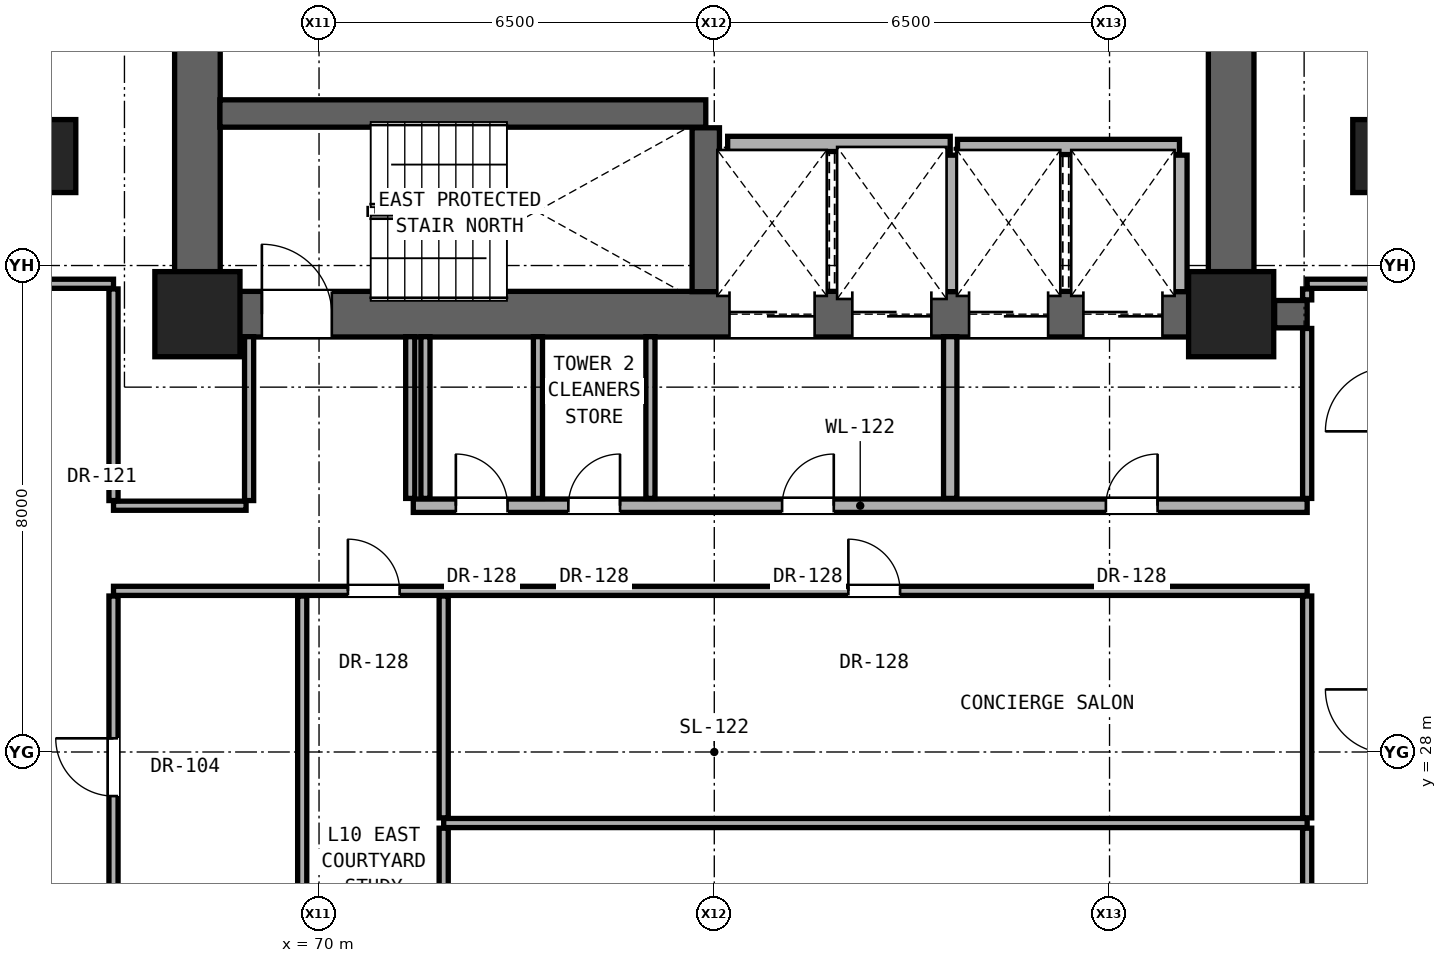
"""IFC4 building model, lengths in metres.
Left out: names, types, materials, properties, quantities, classifications, styles, units other than length and angle.
Written with IfcOpenShell. Run it as: python <this file> out.ifc"""

import sys

from ifc_helpers import new_model, si_unit, direction, frame, frame_2d, origin, origin_2d, place, context, subcontext, project, spatial, rectangle, extrude, element, fill, save


model = new_model("IFC4")
c1 = context("Model", 3, precision=1e-05, world=origin(), true_north=direction((0.0, 1.0)))
c2 = subcontext(c1, "Body", "Model", "MODEL_VIEW")
j1 = project(units=[si_unit("LENGTHUNIT", "METRE"), si_unit("PLANEANGLEUNIT", "RADIAN")], contexts=[c1])
p1 = place(None, origin())
s1 = spatial("IfcSite", under=j1, at=p1, CompositionType="ELEMENT")
p2 = place(p1, origin())
s2 = spatial("IfcBuilding", under=s1, at=p2, CompositionType="ELEMENT")
p3 = place(p2, frame((0.0, 0.0, 38.9)))
s3 = spatial("IfcBuildingStorey", under=s2, at=p3, CompositionType="ELEMENT", Elevation=38.9)
for number, where, z_axis, x_axis in (
    (1, (68.0, 35.2, 0.0), (0.0, 0.0, 1.0), (1.0, 0.0, 0.0)),
    (2, (85.0, 35.2, 0.0), (0.0, 0.0, 1.0), (1.0, 0.0, 0.0)),
):
    element("IfcColumn", number, at=place(p3, frame(where, z_axis=z_axis, x_axis=x_axis)), inside=s3, PredefinedType="COLUMN", context=c2, shape_type="SweptSolid", body=[
        extrude(rectangle(XDim=1.4, YDim=1.4, at=origin_2d()), origin(), (0.0, 0.0, 1.0), 3.3),
    ])
for number, where, z_axis, x_axis in (
    (3, (65.6, 37.8, 0.0), (0.0, 0.0, 1.0), (1.0, 0.0, 0.0)),
    (4, (87.4, 37.8, 0.0), (0.0, 0.0, 1.0), (1.0, 0.0, 0.0)),
):
    element("IfcColumn", number, at=place(p3, frame(where, z_axis=z_axis, x_axis=x_axis)), inside=s3, PredefinedType="PILASTER", context=c2, shape_type="SweptSolid", body=[
        extrude(rectangle(XDim=0.8, YDim=1.2, at=origin_2d()), origin(), (0.0, 0.0, 1.0), 3.3),
    ])
for number, where, z_axis, x_axis in (
    (5, (68.0, 35.2, 0.0), (0.0, 0.0, 1.0), (0.0, 1.0, 0.0)),
    (6, (85.0, 35.2, 0.0), (0.0, 0.0, 1.0), (0.0, 1.0, 0.0)),
):
    element("IfcWall", number, at=place(p3, frame(where, z_axis=z_axis, x_axis=x_axis)), inside=s3, PredefinedType="SHEAR", context=c2, shape_type="SweptSolid", body=[
        extrude(rectangle(XDim=5.6, YDim=0.75, at=frame_2d((2.8, 0.0))), origin(), (0.0, 0.0, 1.0), 3.06),
    ])
p4 = place(p3, frame((68.0, 35.2, 0.0), z_axis=(0.0, 0.0, 1.0), x_axis=(1.0, 0.0, 0.0)))
e7 = element("IfcWall", 7, at=p4, inside=s3, PredefinedType="SHEAR", context=c2, shape_type="SweptSolid", body=[
    extrude(rectangle(XDim=17.0, YDim=0.75, at=frame_2d((8.5, 0.0))), origin(), (0.0, 0.0, 1.0), 3.06),
])
p5 = place(p4, frame((1.06, 0.0, 0.0)))
e8 = element("IfcOpeningElement", 8, at=p5, cuts=e7, PredefinedType="OPENING", context=c2, shape_type="SweptSolid", body=[
    extrude(rectangle(XDim=1.15, YDim=2.2, at=frame_2d((0.575, 1.1))), frame((0.0, 0.385, 0.0), z_axis=(0.0, -1.0, 0.0), x_axis=(1.0, 0.0, 0.0)), (0.0, 0.0, 1.0), 0.77),
])
p6 = place(p4, frame((8.75, 0.0, 0.0)))
e9 = element("IfcOpeningElement", 9, at=p6, cuts=e7, PredefinedType="OPENING", context=c2, shape_type="SweptSolid", body=[
    extrude(rectangle(XDim=1.4, YDim=2.35, at=frame_2d((0.7, 1.175))), frame((0.0, 0.385, 0.0), z_axis=(0.0, -1.0, 0.0), x_axis=(1.0, 0.0, 0.0)), (0.0, 0.0, 1.0), 0.77),
])
p7 = place(p4, frame((10.77, 0.0, 0.0)))
e10 = element("IfcOpeningElement", 10, at=p7, cuts=e7, PredefinedType="OPENING", context=c2, shape_type="SweptSolid", body=[
    extrude(rectangle(XDim=1.3, YDim=2.3, at=frame_2d((0.65, 1.15))), frame((0.0, 0.385, 0.0), z_axis=(0.0, -1.0, 0.0), x_axis=(1.0, 0.0, 0.0)), (0.0, 0.0, 1.0), 0.77),
])
p8 = place(p4, frame((12.69, 0.0, 0.0)))
e11 = element("IfcOpeningElement", 11, at=p8, cuts=e7, PredefinedType="OPENING", context=c2, shape_type="SweptSolid", body=[
    extrude(rectangle(XDim=1.3, YDim=2.3, at=frame_2d((0.65, 1.15))), frame((0.0, 0.385, 0.0), z_axis=(0.0, -1.0, 0.0), x_axis=(1.0, 0.0, 0.0)), (0.0, 0.0, 1.0), 0.77),
])
p9 = place(p4, frame((14.57, 0.0, 0.0)))
e12 = element("IfcOpeningElement", 12, at=p9, cuts=e7, PredefinedType="OPENING", context=c2, shape_type="SweptSolid", body=[
    extrude(rectangle(XDim=1.3, YDim=2.3, at=frame_2d((0.65, 1.15))), frame((0.0, 0.385, 0.0), z_axis=(0.0, -1.0, 0.0), x_axis=(1.0, 0.0, 0.0)), (0.0, 0.0, 1.0), 0.77),
])
p10 = place(p3, frame((72.05, 26.832, 0.0), z_axis=(0.0, 0.0, 1.0), x_axis=(1.0, 0.0, 0.0)))
e13 = element("IfcWall", 13, at=p10, inside=s3, PredefinedType="PARTITIONING", context=c2, shape_type="SweptSolid", body=[
    extrude(rectangle(XDim=14.2, YDim=0.15, at=frame_2d((7.1, 0.0))), origin(), (0.0, 0.0, 1.0), 2.125),
])
p11 = place(p3, frame((66.62, 30.65, 0.0), z_axis=(0.0, 0.0, 1.0), x_axis=(1.0, 0.0, 0.0)))
e14 = element("IfcWall", 14, at=p11, inside=s3, PredefinedType="PARTITIONING", context=c2, shape_type="SweptSolid", body=[
    extrude(rectangle(XDim=19.63, YDim=0.15, at=frame_2d((9.815, 0.0))), origin(), (0.0, 0.0, 1.0), 2.125),
])
p12 = place(p11, frame((3.855, 0.0, 0.0)))
e15 = element("IfcOpeningElement", 15, at=p12, cuts=e14, PredefinedType="OPENING", context=c2, shape_type="SweptSolid", body=[
    extrude(rectangle(XDim=0.85, YDim=2.01, at=frame_2d((0.425, 1.005))), frame((0.0, 0.085, 0.0), z_axis=(0.0, -1.0, 0.0), x_axis=(1.0, 0.0, 0.0)), (0.0, 0.0, 1.0), 0.17),
])
p13 = place(p11, frame((12.085, 0.0, 0.0)))
e16 = element("IfcOpeningElement", 16, at=p13, cuts=e14, PredefinedType="OPENING", context=c2, shape_type="SweptSolid", body=[
    extrude(rectangle(XDim=0.85, YDim=2.01, at=frame_2d((0.425, 1.005))), frame((0.0, 0.085, 0.0), z_axis=(0.0, -1.0, 0.0), x_axis=(1.0, 0.0, 0.0)), (0.0, 0.0, 1.0), 0.17),
])
p14 = place(p3, frame((66.62, 32.05, 0.0), z_axis=(0.0, 0.0, 1.0), x_axis=(1.0, 0.0, 0.0)))
e17 = element("IfcWall", 17, at=p14, inside=s3, PredefinedType="PARTITIONING", context=c2, shape_type="SweptSolid", body=[
    extrude(rectangle(XDim=2.18, YDim=0.15, at=frame_2d((1.09, 0.0))), origin(), (0.0, 0.0, 1.0), 2.125),
])
p15 = place(p3, frame((71.55, 32.05, 0.0), z_axis=(0.0, 0.0, 1.0), x_axis=(1.0, 0.0, 0.0)))
e18 = element("IfcWall", 18, at=p15, inside=s3, PredefinedType="SOLIDWALL", context=c2, shape_type="SweptSolid", body=[
    extrude(rectangle(XDim=14.7, YDim=0.22, at=frame_2d((7.35, 0.0))), origin(), (0.0, 0.0, 1.0), 2.125),
])
p16 = place(p15, frame((11.39, 0.0, 0.0)))
e19 = element("IfcOpeningElement", 19, at=p16, cuts=e18, PredefinedType="OPENING", context=c2, shape_type="SweptSolid", body=[
    extrude(rectangle(XDim=0.85, YDim=2.01, at=frame_2d((0.425, 1.005))), frame((0.0, 0.12, 0.0), z_axis=(0.0, -1.0, 0.0), x_axis=(1.0, 0.0, 0.0)), (0.0, 0.0, 1.0), 0.24),
])
p17 = place(p15, frame((6.065, 0.0, 0.0)))
e20 = element("IfcOpeningElement", 20, at=p17, cuts=e18, PredefinedType="OPENING", context=c2, shape_type="SweptSolid", body=[
    extrude(rectangle(XDim=0.85, YDim=2.01, at=frame_2d((0.425, 1.005))), frame((0.0, 0.12, 0.0), z_axis=(0.0, -1.0, 0.0), x_axis=(1.0, 0.0, 0.0)), (0.0, 0.0, 1.0), 0.24),
])
p18 = place(p15, frame((0.7, 0.0, 0.0)))
e21 = element("IfcOpeningElement", 21, at=p18, cuts=e18, PredefinedType="OPENING", context=c2, shape_type="SweptSolid", body=[
    extrude(rectangle(XDim=0.85, YDim=2.01, at=frame_2d((0.425, 1.005))), frame((0.0, 0.12, 0.0), z_axis=(0.0, -1.0, 0.0), x_axis=(1.0, 0.0, 0.0)), (0.0, 0.0, 1.0), 0.24),
])
p19 = place(p15, frame((2.55, 0.0, 0.0)))
e22 = element("IfcOpeningElement", 22, at=p19, cuts=e18, PredefinedType="OPENING", context=c2, shape_type="SweptSolid", body=[
    extrude(rectangle(XDim=0.85, YDim=2.01, at=frame_2d((0.425, 1.005))), frame((0.0, 0.12, 0.0), z_axis=(0.0, -1.0, 0.0), x_axis=(1.0, 0.0, 0.0)), (0.0, 0.0, 1.0), 0.24),
])
p20 = place(p3, frame((85.715, 35.2, 0.0), z_axis=(0.0, 0.0, 1.0), x_axis=(1.0, 0.0, 0.0)))
e23 = element("IfcWall", 23, at=p20, inside=s3, PredefinedType="SHEAR", context=c2, shape_type="SweptSolid", body=[
    extrude(rectangle(XDim=0.535, YDim=0.45, at=frame_2d((0.268, 0.0))), origin(), (0.0, 0.0, 1.0), 3.06),
])
p21 = place(p3, frame((65.25, 35.7, 0.0), z_axis=(0.0, 0.0, 1.0), x_axis=(1.0, 0.0, 0.0)))
e24 = element("IfcWall", 24, at=p21, inside=s3, PredefinedType="PARTITIONING", context=c2, shape_type="SweptSolid", body=[
    extrude(rectangle(XDim=1.37, YDim=0.15, at=frame_2d((0.685, 0.0))), origin(), (0.0, 0.0, 1.0), 3.06),
])
p22 = place(p3, frame((86.25, 35.7, 0.0), z_axis=(0.0, 0.0, 1.0), x_axis=(1.0, 0.0, 0.0)))
e25 = element("IfcWall", 25, at=p22, inside=s3, PredefinedType="PARTITIONING", context=c2, shape_type="SweptSolid", body=[
    extrude(rectangle(XDim=1.35, YDim=0.15, at=frame_2d((0.675, 0.0))), origin(), (0.0, 0.0, 1.0), 3.06),
])
p23 = place(p3, frame((80.5, 37.95, 0.0), z_axis=(0.0, 0.0, 1.0), x_axis=(1.0, 0.0, 0.0)))
e26 = element("IfcWall", 26, at=p23, inside=s3, PredefinedType="SOLIDWALL", context=c2, shape_type="SweptSolid", body=[
    extrude(rectangle(XDim=3.65, YDim=0.25, at=frame_2d((1.825, 0.0))), origin(), (0.0, 0.0, 1.0), 3.06),
])
p24 = place(p3, frame((76.72, 38.0, 0.0), z_axis=(0.0, 0.0, 1.0), x_axis=(1.0, 0.0, 0.0)))
e27 = element("IfcWall", 27, at=p24, inside=s3, PredefinedType="SOLIDWALL", context=c2, shape_type="SweptSolid", body=[
    extrude(rectangle(XDim=3.66, YDim=0.25, at=frame_2d((1.83, 0.0))), origin(), (0.0, 0.0, 1.0), 3.06),
])
p25 = place(p3, frame((68.37, 38.5, 0.0), z_axis=(0.0, 0.0, 1.0), x_axis=(1.0, 0.0, 0.0)))
e28 = element("IfcWall", 28, at=p25, inside=s3, PredefinedType="SHEAR", context=c2, shape_type="SweptSolid", body=[
    extrude(rectangle(XDim=7.99, YDim=0.45, at=frame_2d((3.995, 0.0))), origin(), (0.0, 0.0, 1.0), 3.06),
])
p26 = place(p3, frame((66.62, 24.935, 0.0), z_axis=(0.0, 0.0, 1.0), x_axis=(0.0, 1.0, 0.0)))
e29 = element("IfcWall", 29, at=p26, inside=s3, PredefinedType="PARTITIONING", context=c2, shape_type="SweptSolid", body=[
    extrude(rectangle(XDim=5.63, YDim=0.15, at=frame_2d((2.815, 0.0))), origin(), (0.0, 0.0, 1.0), 2.279),
])
p27 = place(p26, frame((2.34, 0.0, 0.0)))
e30 = element("IfcOpeningElement", 30, at=p27, cuts=e29, PredefinedType="OPENING", context=c2, shape_type="SweptSolid", body=[
    extrude(rectangle(XDim=0.95, YDim=2.15, at=frame_2d((0.475, 1.075))), frame((0.0, 0.085, 0.0), z_axis=(0.0, -1.0, 0.0), x_axis=(1.0, 0.0, 0.0)), (0.0, 0.0, 1.0), 0.17),
])
p28 = place(p3, frame((66.62, 32.135, 0.0), z_axis=(0.0, 0.0, 1.0), x_axis=(0.0, 1.0, 0.0)))
e31 = element("IfcWall", 31, at=p28, inside=s3, PredefinedType="PARTITIONING", context=c2, shape_type="SweptSolid", body=[
    extrude(rectangle(XDim=3.48, YDim=0.15, at=frame_2d((1.74, 0.0))), origin(), (0.0, 0.0, 1.0), 2.452),
])
p29 = place(p3, frame((68.85, 32.135, 0.0), z_axis=(0.0, 0.0, 1.0), x_axis=(0.0, 1.0, 0.0)))
e32 = element("IfcWall", 32, at=p29, inside=s3, PredefinedType="PARTITIONING", context=c2, shape_type="SweptSolid", body=[
    extrude(rectangle(XDim=2.695, YDim=0.15, at=frame_2d((1.348, 0.0))), origin(), (0.0, 0.0, 1.0), 3.06),
])
p30 = place(p3, frame((69.723, 24.935, 0.0), z_axis=(0.0, 0.0, 1.0), x_axis=(0.0, 1.0, 0.0)))
e33 = element("IfcWall", 33, at=p30, inside=s3, PredefinedType="PARTITIONING", context=c2, shape_type="SweptSolid", body=[
    extrude(rectangle(XDim=5.63, YDim=0.15, at=frame_2d((2.815, 0.0))), origin(), (0.0, 0.0, 1.0), 2.125),
])
for number, where, z_axis, x_axis in (
    (34, (71.5, 32.17, 0.0), (0.0, 0.0, 1.0), (0.0, 1.0, 0.0)),
    (35, (71.75, 32.17, 0.0), (0.0, 0.0, 1.0), (0.0, 1.0, 0.0)),
):
    element("IfcWall", number, at=place(p3, frame(where, z_axis=z_axis, x_axis=x_axis)), inside=s3, PredefinedType="PARTITIONING", context=c2, shape_type="SweptSolid", body=[
        extrude(rectangle(XDim=2.66, YDim=0.15, at=frame_2d((1.33, 0.0))), origin(), (0.0, 0.0, 1.0), 3.06),
    ])
p31 = place(p3, frame((72.05, 22.435, 0.0), z_axis=(0.0, 0.0, 1.0), x_axis=(0.0, 1.0, 0.0)))
e36 = element("IfcWall", 36, at=p31, inside=s3, PredefinedType="PARTITIONING", context=c2, shape_type="SweptSolid", body=[
    extrude(rectangle(XDim=4.312, YDim=0.15, at=frame_2d((2.156, 0.0))), origin(), (0.0, 0.0, 1.0), 2.589),
])
p32 = place(p3, frame((72.05, 26.917, 0.0), z_axis=(0.0, 0.0, 1.0), x_axis=(0.0, 1.0, 0.0)))
e37 = element("IfcWall", 37, at=p32, inside=s3, PredefinedType="PARTITIONING", context=c2, shape_type="SweptSolid", body=[
    extrude(rectangle(XDim=3.648, YDim=0.15, at=frame_2d((1.824, 0.0))), origin(), (0.0, 0.0, 1.0), 2.125),
])
for number, where, z_axis, x_axis in (
    (38, (73.6, 32.17, 0.0), (0.0, 0.0, 1.0), (0.0, 1.0, 0.0)),
    (39, (75.45, 32.17, 0.0), (0.0, 0.0, 1.0), (0.0, 1.0, 0.0)),
):
    element("IfcWall", number, at=place(p3, frame(where, z_axis=z_axis, x_axis=x_axis)), inside=s3, PredefinedType="PARTITIONING", context=c2, shape_type="SweptSolid", body=[
        extrude(rectangle(XDim=2.66, YDim=0.15, at=frame_2d((1.33, 0.0))), origin(), (0.0, 0.0, 1.0), 3.06),
    ])
p33 = place(p3, frame((76.36, 35.57, 0.0), z_axis=(0.0, 0.0, 1.0), x_axis=(0.0, 1.0, 0.0)))
e40 = element("IfcWall", 40, at=p33, inside=s3, PredefinedType="SHEAR", context=c2, shape_type="SweptSolid", body=[
    extrude(rectangle(XDim=2.695, YDim=0.45, at=frame_2d((1.347, 0.0))), origin(), (0.0, 0.0, 1.0), 3.06),
])
p34 = place(p3, frame((80.38, 32.17, 0.0), z_axis=(0.0, 0.0, 1.0), x_axis=(0.0, 1.0, 0.0)))
e41 = element("IfcWall", 41, at=p34, inside=s3, PredefinedType="SOLIDWALL", context=c2, shape_type="SweptSolid", body=[
    extrude(rectangle(XDim=2.66, YDim=0.22, at=frame_2d((1.33, 0.0))), origin(), (0.0, 0.0, 1.0), 3.06),
])
for number, where, z_axis, x_axis in (
    (42, (80.38, 35.57, 0.0), (0.0, 0.0, 1.0), (0.0, 1.0, 0.0)),
    (43, (84.15, 35.57, 0.0), (0.0, 0.0, 1.0), (0.0, 1.0, 0.0)),
):
    element("IfcWall", number, at=place(p3, frame(where, z_axis=z_axis, x_axis=x_axis)), inside=s3, PredefinedType="SOLIDWALL", context=c2, shape_type="SweptSolid", body=[
        extrude(rectangle(XDim=2.245, YDim=0.25, at=frame_2d((1.123, 0.0))), origin(), (0.0, 0.0, 1.0), 3.06),
    ])
p35 = place(p3, frame((86.25, 22.435, 0.0), z_axis=(0.0, 0.0, 1.0), x_axis=(0.0, 1.0, 0.0)))
e44 = element("IfcWall", 44, at=p35, inside=s3, PredefinedType="PARTITIONING", context=c2, shape_type="SweptSolid", body=[
    extrude(rectangle(XDim=4.312, YDim=0.15, at=frame_2d((2.156, 0.0))), origin(), (0.0, 0.0, 1.0), 3.06),
])
p36 = place(p3, frame((86.25, 26.917, 0.0), z_axis=(0.0, 0.0, 1.0), x_axis=(0.0, 1.0, 0.0)))
e45 = element("IfcWall", 45, at=p36, inside=s3, PredefinedType="PARTITIONING", context=c2, shape_type="SweptSolid", body=[
    extrude(rectangle(XDim=3.648, YDim=0.15, at=frame_2d((1.824, 0.0))), origin(), (0.0, 0.0, 1.0), 2.279),
])
p37 = place(p3, frame((86.25, 32.17, 0.0), z_axis=(0.0, 0.0, 1.0), x_axis=(0.0, 1.0, 0.0)))
e46 = element("IfcWall", 46, at=p37, inside=s3, PredefinedType="PARTITIONING", context=c2, shape_type="SweptSolid", body=[
    extrude(rectangle(XDim=2.795, YDim=0.15, at=frame_2d((1.397, 0.0))), origin(), (0.0, 0.0, 1.0), 2.452),
])
p38 = place(p3, frame((86.25, 35.435, 0.0), z_axis=(0.0, 0.0, 1.0), x_axis=(0.0, 1.0, 0.0)))
e47 = element("IfcWall", 47, at=p38, inside=s3, PredefinedType="PARTITIONING", context=c2, shape_type="SweptSolid", body=[
    extrude(rectangle(XDim=0.18, YDim=0.15, at=frame_2d((0.09, 0.0))), origin(), (0.0, 0.0, 1.0), 2.452),
])
p39 = place(p16, origin())
e48 = element("IfcDoor", 48, at=p39, inside=s3, OperationType="SINGLE_SWING_RIGHT", PredefinedType="DOOR", context=c2, shape_type="SweptSolid", body=[
    extrude(rectangle(XDim=0.85, YDim=2.01, at=frame_2d((0.425, 1.005))), frame((0.0, 0.025, 0.0), z_axis=(0.0, -1.0, 0.0), x_axis=(1.0, 0.0, 0.0)), (0.0, 0.0, 1.0), 0.05),
])
fill(e19, e48)
p40 = place(p5, origin())
e49 = element("IfcDoor", 49, at=p40, inside=s3, OperationType="SINGLE_SWING_LEFT", PredefinedType="DOOR", context=c2, shape_type="SweptSolid", body=[
    extrude(rectangle(XDim=1.15, YDim=2.2, at=frame_2d((0.575, 1.1))), frame((0.0, 0.025, 0.0), z_axis=(0.0, -1.0, 0.0), x_axis=(1.0, 0.0, 0.0)), (0.0, 0.0, 1.0), 0.05),
])
fill(e8, e49)
p41 = place(p17, origin())
e50 = element("IfcDoor", 50, at=p41, inside=s3, OperationType="SINGLE_SWING_RIGHT", PredefinedType="DOOR", context=c2, shape_type="SweptSolid", body=[
    extrude(rectangle(XDim=0.85, YDim=2.01, at=frame_2d((0.425, 1.005))), frame((0.0, 0.025, 0.0), z_axis=(0.0, -1.0, 0.0), x_axis=(1.0, 0.0, 0.0)), (0.0, 0.0, 1.0), 0.05),
])
fill(e20, e50)
p42 = place(p18, origin())
e51 = element("IfcDoor", 51, at=p42, inside=s3, OperationType="SINGLE_SWING_LEFT", PredefinedType="DOOR", context=c2, shape_type="SweptSolid", body=[
    extrude(rectangle(XDim=0.85, YDim=2.01, at=frame_2d((0.425, 1.005))), frame((0.0, 0.025, 0.0), z_axis=(0.0, -1.0, 0.0), x_axis=(1.0, 0.0, 0.0)), (0.0, 0.0, 1.0), 0.05),
])
fill(e21, e51)
p43 = place(p19, origin())
e52 = element("IfcDoor", 52, at=p43, inside=s3, OperationType="SINGLE_SWING_RIGHT", PredefinedType="DOOR", context=c2, shape_type="SweptSolid", body=[
    extrude(rectangle(XDim=0.85, YDim=2.01, at=frame_2d((0.425, 1.005))), frame((0.0, 0.025, 0.0), z_axis=(0.0, -1.0, 0.0), x_axis=(1.0, 0.0, 0.0)), (0.0, 0.0, 1.0), 0.05),
])
fill(e22, e52)
p44 = place(p27, origin())
e53 = element("IfcDoor", 53, at=p44, inside=s3, OperationType="SINGLE_SWING_RIGHT", PredefinedType="DOOR", context=c2, shape_type="SweptSolid", body=[
    extrude(rectangle(XDim=0.95, YDim=2.15, at=frame_2d((0.475, 1.075))), frame((0.0, 0.025, 0.0), z_axis=(0.0, -1.0, 0.0), x_axis=(1.0, 0.0, 0.0)), (0.0, 0.0, 1.0), 0.05),
])
fill(e30, e53)
p45 = place(p12, origin())
e54 = element("IfcDoor", 54, at=p45, inside=s3, OperationType="SINGLE_SWING_LEFT", PredefinedType="DOOR", context=c2, shape_type="SweptSolid", body=[
    extrude(rectangle(XDim=0.85, YDim=2.01, at=frame_2d((0.425, 1.005))), frame((0.0, 0.025, 0.0), z_axis=(0.0, -1.0, 0.0), x_axis=(1.0, 0.0, 0.0)), (0.0, 0.0, 1.0), 0.05),
])
fill(e15, e54)
p46 = place(p13, origin())
e55 = element("IfcDoor", 55, at=p46, inside=s3, OperationType="SINGLE_SWING_LEFT", PredefinedType="DOOR", context=c2, shape_type="SweptSolid", body=[
    extrude(rectangle(XDim=0.85, YDim=2.01, at=frame_2d((0.425, 1.005))), frame((0.0, 0.025, 0.0), z_axis=(0.0, -1.0, 0.0), x_axis=(1.0, 0.0, 0.0)), (0.0, 0.0, 1.0), 0.05),
])
fill(e16, e55)
p47 = place(p6, origin())
e56 = element("IfcDoor", 56, at=p47, inside=s3, OperationType="DOUBLE_DOOR_SLIDING", PredefinedType="DOOR", context=c2, shape_type="SweptSolid", body=[
    extrude(rectangle(XDim=1.4, YDim=2.35, at=frame_2d((0.7, 1.175))), frame((0.0, 0.025, 0.0), z_axis=(0.0, -1.0, 0.0), x_axis=(1.0, 0.0, 0.0)), (0.0, 0.0, 1.0), 0.05),
])
fill(e9, e56)
p48 = place(p7, origin())
e57 = element("IfcDoor", 57, at=p48, inside=s3, OperationType="DOUBLE_DOOR_SLIDING", PredefinedType="DOOR", context=c2, shape_type="SweptSolid", body=[
    extrude(rectangle(XDim=1.3, YDim=2.3, at=frame_2d((0.65, 1.15))), frame((0.0, 0.025, 0.0), z_axis=(0.0, -1.0, 0.0), x_axis=(1.0, 0.0, 0.0)), (0.0, 0.0, 1.0), 0.05),
])
fill(e10, e57)
p49 = place(p8, origin())
e58 = element("IfcDoor", 58, at=p49, inside=s3, OperationType="DOUBLE_DOOR_SLIDING", PredefinedType="DOOR", context=c2, shape_type="SweptSolid", body=[
    extrude(rectangle(XDim=1.3, YDim=2.3, at=frame_2d((0.65, 1.15))), frame((0.0, 0.025, 0.0), z_axis=(0.0, -1.0, 0.0), x_axis=(1.0, 0.0, 0.0)), (0.0, 0.0, 1.0), 0.05),
])
fill(e11, e58)
p50 = place(p9, origin())
e59 = element("IfcDoor", 59, at=p50, inside=s3, OperationType="DOUBLE_DOOR_SLIDING", PredefinedType="DOOR", context=c2, shape_type="SweptSolid", body=[
    extrude(rectangle(XDim=1.3, YDim=2.3, at=frame_2d((0.65, 1.15))), frame((0.0, 0.025, 0.0), z_axis=(0.0, -1.0, 0.0), x_axis=(1.0, 0.0, 0.0)), (0.0, 0.0, 1.0), 0.05),
])
fill(e12, e59)
save(model, sys.argv[1])
